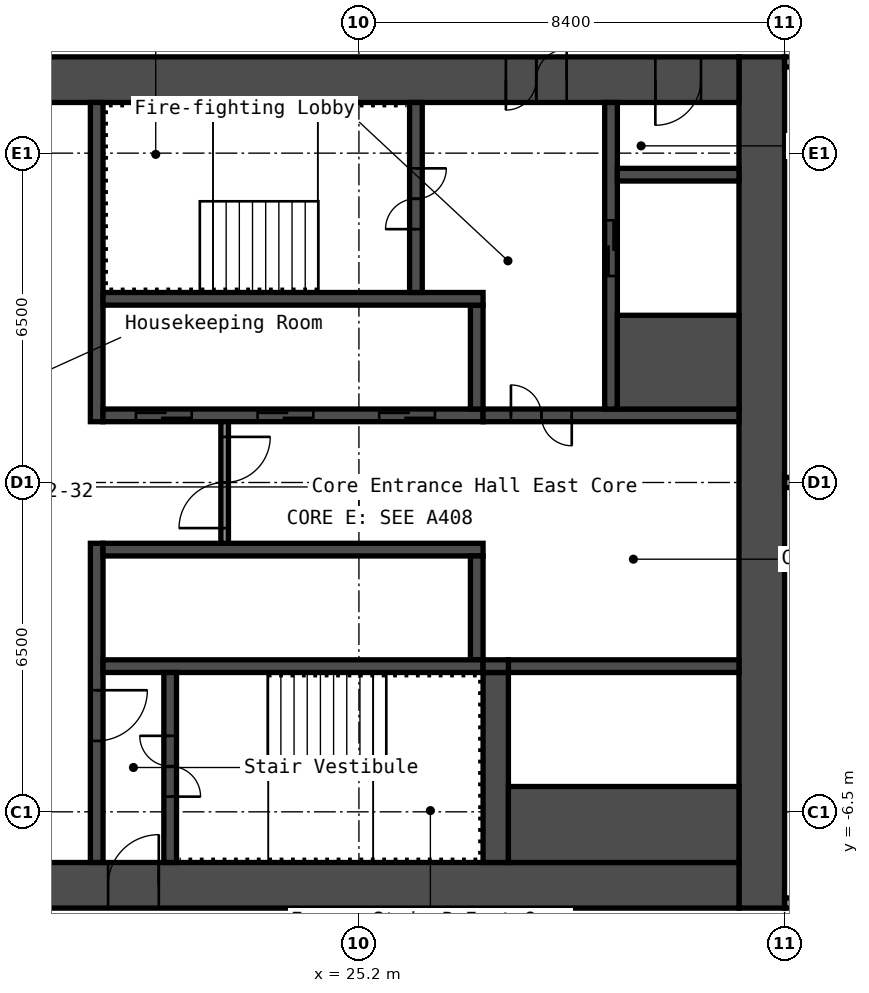
"""IFC4 building model, lengths in metres.
Left out: names, types, materials, properties, quantities, classifications, styles, units other than length and angle.
Written with IfcOpenShell. Run it as: python <this file> out.ifc"""

import sys

from ifc_helpers import new_model, si_unit, direction, frame, frame_2d, origin, place, context, subcontext, project, spatial, rectangle, extrude, element, fill, save


model = new_model("IFC4")
c1 = context("Model", 3, precision=1e-05, world=origin(), true_north=direction((0.0, 1.0)))
c2 = subcontext(c1, "Body", "Model", "MODEL_VIEW")
j1 = project(units=[si_unit("LENGTHUNIT", "METRE"), si_unit("PLANEANGLEUNIT", "RADIAN")], contexts=[c1])
p1 = place(None, origin())
s1 = spatial("IfcSite", under=j1, at=p1, CompositionType="ELEMENT")
p2 = place(p1, origin())
s2 = spatial("IfcBuilding", under=s1, at=p2, CompositionType="ELEMENT")
p3 = place(p2, frame((0.0, 0.0, 58.2)))
s3 = spatial("IfcBuildingStorey", under=s2, at=p3, CompositionType="ELEMENT", Elevation=58.2)
p4 = place(p3, frame((33.15, -8.4, 0.0), z_axis=(0.0, 0.0, 1.0), x_axis=(0.0, 1.0, 0.0)))
e1 = element("IfcWall", 1, at=p4, inside=s3, PredefinedType="SHEAR", context=c2, shape_type="SweptSolid", body=[
    extrude(rectangle(XDim=16.8, YDim=0.9, at=frame_2d((8.4, 0.0))), origin(), (0.0, 0.0, 1.0), 2.8),
])
p5 = place(p3, frame((17.7, 7.95, 0.0), z_axis=(0.0, 0.0, 1.0), x_axis=(1.0, 0.0, 0.0)))
e2 = element("IfcWall", 2, at=p5, inside=s3, PredefinedType="SHEAR", context=c2, shape_type="SweptSolid", body=[
    extrude(rectangle(XDim=15.0, YDim=0.9, at=frame_2d((7.5, 0.0))), origin(), (0.0, 0.0, 1.0), 2.8),
])
p6 = place(p5, frame((10.4, 0.0, 0.0)))
e3 = element("IfcOpeningElement", 3, at=p6, cuts=e2, PredefinedType="OPENING", context=c2, shape_type="SweptSolid", body=[
    extrude(rectangle(XDim=1.2, YDim=2.1, at=frame_2d((0.6, 1.05))), frame((0.0, 0.46, 0.0), z_axis=(0.0, -1.0, 0.0), x_axis=(1.0, 0.0, 0.0)), (0.0, 0.0, 1.0), 0.92),
])
p7 = place(p5, frame((13.35, 0.0, 0.0)))
e4 = element("IfcOpeningElement", 4, at=p7, cuts=e2, PredefinedType="OPENING", context=c2, shape_type="SweptSolid", body=[
    extrude(rectangle(XDim=0.9, YDim=2.1, at=frame_2d((0.45, 1.05))), frame((0.0, 0.46, 0.0), z_axis=(0.0, -1.0, 0.0), x_axis=(1.0, 0.0, 0.0)), (0.0, 0.0, 1.0), 0.92),
])
p8 = place(p3, frame((17.7, -7.95, 0.0), z_axis=(0.0, 0.0, 1.0), x_axis=(1.0, 0.0, 0.0)))
e5 = element("IfcWall", 5, at=p8, inside=s3, PredefinedType="SHEAR", context=c2, shape_type="SweptSolid", body=[
    extrude(rectangle(XDim=15.0, YDim=0.9, at=frame_2d((7.5, 0.0))), origin(), (0.0, 0.0, 1.0), 2.8),
])
p9 = place(p8, frame((2.55, 0.0, 0.0)))
e6 = element("IfcOpeningElement", 6, at=p9, cuts=e5, PredefinedType="OPENING", context=c2, shape_type="SweptSolid", body=[
    extrude(rectangle(XDim=1.0, YDim=2.1, at=frame_2d((0.5, 1.05))), frame((0.0, 0.46, 0.0), z_axis=(0.0, -1.0, 0.0), x_axis=(1.0, 0.0, 0.0)), (0.0, 0.0, 1.0), 0.92),
])
p10 = place(p3, frame((20.025, 1.2, 0.0), z_axis=(0.0, 0.0, 1.0), x_axis=(0.0, 1.0, 0.0)))
e7 = element("IfcWall", 7, at=p10, inside=s3, PredefinedType="SHEAR", context=c2, shape_type="SweptSolid", body=[
    extrude(rectangle(XDim=6.3, YDim=0.25, at=frame_2d((3.15, 0.0))), origin(), (0.0, 0.0, 1.0), 2.8),
])
p11 = place(p3, frame((20.025, -7.5, 0.0), z_axis=(0.0, 0.0, 1.0), x_axis=(0.0, 1.0, 0.0)))
e8 = element("IfcWall", 8, at=p11, inside=s3, PredefinedType="SHEAR", context=c2, shape_type="SweptSolid", body=[
    extrude(rectangle(XDim=6.3, YDim=0.25, at=frame_2d((3.15, 0.0))), origin(), (0.0, 0.0, 1.0), 2.8),
])
p12 = place(p11, frame((2.4, 0.0, 0.0)))
e9 = element("IfcOpeningElement", 9, at=p12, cuts=e8, PredefinedType="OPENING", context=c2, shape_type="SweptSolid", body=[
    extrude(rectangle(XDim=1.0, YDim=2.1, at=frame_2d((0.5, 1.05))), frame((0.0, 0.135, 0.0), z_axis=(0.0, -1.0, 0.0), x_axis=(1.0, 0.0, 0.0)), (0.0, 0.0, 1.0), 0.27),
])
p13 = place(p3, frame((20.15, 1.325, 0.0), z_axis=(0.0, 0.0, 1.0), x_axis=(1.0, 0.0, 0.0)))
e10 = element("IfcWall", 10, at=p13, inside=s3, PredefinedType="SHEAR", context=c2, shape_type="SweptSolid", body=[
    extrude(rectangle(XDim=7.5, YDim=0.25, at=frame_2d((3.75, 0.0))), origin(), (0.0, 0.0, 1.0), 2.8),
])
p14 = place(p13, frame((0.65, 0.0, 0.0)))
e11 = element("IfcOpeningElement", 11, at=p14, cuts=e10, PredefinedType="OPENING", context=c2, shape_type="SweptSolid", body=[
    extrude(rectangle(XDim=1.1, YDim=2.1, at=frame_2d((0.55, 1.05))), frame((0.0, 0.135, 0.0), z_axis=(0.0, -1.0, 0.0), x_axis=(1.0, 0.0, 0.0)), (0.0, 0.0, 1.0), 0.27),
])
p15 = place(p13, frame((3.05, 0.0, 0.0)))
e12 = element("IfcOpeningElement", 12, at=p15, cuts=e10, PredefinedType="OPENING", context=c2, shape_type="SweptSolid", body=[
    extrude(rectangle(XDim=1.1, YDim=2.1, at=frame_2d((0.55, 1.05))), frame((0.0, 0.135, 0.0), z_axis=(0.0, -1.0, 0.0), x_axis=(1.0, 0.0, 0.0)), (0.0, 0.0, 1.0), 0.27),
])
p16 = place(p13, frame((5.45, 0.0, 0.0)))
e13 = element("IfcOpeningElement", 13, at=p16, cuts=e10, PredefinedType="OPENING", context=c2, shape_type="SweptSolid", body=[
    extrude(rectangle(XDim=1.1, YDim=2.1, at=frame_2d((0.55, 1.05))), frame((0.0, 0.135, 0.0), z_axis=(0.0, -1.0, 0.0), x_axis=(1.0, 0.0, 0.0)), (0.0, 0.0, 1.0), 0.27),
])
p17 = place(p3, frame((27.525, 1.45, 0.0), z_axis=(0.0, 0.0, 1.0), x_axis=(0.0, 1.0, 0.0)))
e14 = element("IfcWall", 14, at=p17, inside=s3, PredefinedType="SHEAR", context=c2, shape_type="SweptSolid", body=[
    extrude(rectangle(XDim=2.05, YDim=0.25, at=frame_2d((1.025, 0.0))), origin(), (0.0, 0.0, 1.0), 2.8),
])
p18 = place(p3, frame((20.15, 3.625, 0.0), z_axis=(0.0, 0.0, 1.0), x_axis=(1.0, 0.0, 0.0)))
e15 = element("IfcWall", 15, at=p18, inside=s3, PredefinedType="SHEAR", context=c2, shape_type="SweptSolid", body=[
    extrude(rectangle(XDim=7.5, YDim=0.25, at=frame_2d((3.75, 0.0))), origin(), (0.0, 0.0, 1.0), 2.8),
])
p19 = place(p3, frame((26.325, 3.75, 0.0), z_axis=(0.0, 0.0, 1.0), x_axis=(0.0, 1.0, 0.0)))
e16 = element("IfcWall", 16, at=p19, inside=s3, PredefinedType="SHEAR", context=c2, shape_type="SweptSolid", body=[
    extrude(rectangle(XDim=3.75, YDim=0.25, at=frame_2d((1.875, 0.0))), origin(), (0.0, 0.0, 1.0), 2.8),
])
p20 = place(p19, frame((1.25, 0.0, 0.0)))
e17 = element("IfcOpeningElement", 17, at=p20, cuts=e16, PredefinedType="OPENING", context=c2, shape_type="SweptSolid", body=[
    extrude(rectangle(XDim=1.2, YDim=2.1, at=frame_2d((0.6, 1.05))), frame((0.0, 0.135, 0.0), z_axis=(0.0, -1.0, 0.0), x_axis=(1.0, 0.0, 0.0)), (0.0, 0.0, 1.0), 0.27),
])
p21 = place(p3, frame((27.65, 1.325, 0.0), z_axis=(0.0, 0.0, 1.0), x_axis=(1.0, 0.0, 0.0)))
e18 = element("IfcWall", 18, at=p21, inside=s3, PredefinedType="SHEAR", context=c2, shape_type="SweptSolid", body=[
    extrude(rectangle(XDim=5.05, YDim=0.25, at=frame_2d((2.525, 0.0))), origin(), (0.0, 0.0, 1.0), 2.8),
])
p22 = place(p21, frame((0.55, 0.0, 0.0)))
e19 = element("IfcOpeningElement", 19, at=p22, cuts=e18, PredefinedType="OPENING", context=c2, shape_type="SweptSolid", body=[
    extrude(rectangle(XDim=1.2, YDim=2.1, at=frame_2d((0.6, 1.05))), frame((0.0, 0.135, 0.0), z_axis=(0.0, -1.0, 0.0), x_axis=(1.0, 0.0, 0.0)), (0.0, 0.0, 1.0), 0.27),
])
p23 = place(p3, frame((30.175, 1.45, 0.0), z_axis=(0.0, 0.0, 1.0), x_axis=(0.0, 1.0, 0.0)))
e20 = element("IfcWall", 20, at=p23, inside=s3, PredefinedType="SHEAR", context=c2, shape_type="SweptSolid", body=[
    extrude(rectangle(XDim=6.05, YDim=0.25, at=frame_2d((3.025, 0.0))), origin(), (0.0, 0.0, 1.0), 2.8),
])
p24 = place(p23, frame((2.625, 0.0, 0.0)))
e21 = element("IfcOpeningElement", 21, at=p24, cuts=e20, PredefinedType="OPENING", context=c2, shape_type="SweptSolid", body=[
    extrude(rectangle(XDim=1.1, YDim=2.1, at=frame_2d((0.55, 1.05))), frame((0.0, 0.135, 0.0), z_axis=(0.0, -1.0, 0.0), x_axis=(1.0, 0.0, 0.0)), (0.0, 0.0, 1.0), 0.27),
])
p25 = place(p3, frame((30.3, 2.375, 0.0), z_axis=(0.0, 0.0, 1.0), x_axis=(1.0, 0.0, 0.0)))
e22 = element("IfcWall", 22, at=p25, inside=s3, PredefinedType="SHEAR", context=c2, shape_type="SweptSolid", body=[
    extrude(rectangle(XDim=2.4, YDim=1.85, at=frame_2d((1.2, 0.0))), origin(), (0.0, 0.0, 1.0), 2.8),
])
p26 = place(p3, frame((30.3, 6.075, 0.0), z_axis=(0.0, 0.0, 1.0), x_axis=(1.0, 0.0, 0.0)))
e23 = element("IfcWall", 23, at=p26, inside=s3, PredefinedType="SHEAR", context=c2, shape_type="SweptSolid", body=[
    extrude(rectangle(XDim=2.4, YDim=0.25, at=frame_2d((1.2, 0.0))), origin(), (0.0, 0.0, 1.0), 2.8),
])
p27 = place(p3, frame((20.15, -1.325, 0.0), z_axis=(0.0, 0.0, 1.0), x_axis=(1.0, 0.0, 0.0)))
e24 = element("IfcWall", 24, at=p27, inside=s3, PredefinedType="SHEAR", context=c2, shape_type="SweptSolid", body=[
    extrude(rectangle(XDim=7.5, YDim=0.25, at=frame_2d((3.75, 0.0))), origin(), (0.0, 0.0, 1.0), 2.8),
])
p28 = place(p3, frame((27.525, -3.5, 0.0), z_axis=(0.0, 0.0, 1.0), x_axis=(0.0, 1.0, 0.0)))
e25 = element("IfcWall", 25, at=p28, inside=s3, PredefinedType="SHEAR", context=c2, shape_type="SweptSolid", body=[
    extrude(rectangle(XDim=2.05, YDim=0.25, at=frame_2d((1.025, 0.0))), origin(), (0.0, 0.0, 1.0), 2.8),
])
p29 = place(p3, frame((20.15, -3.625, 0.0), z_axis=(0.0, 0.0, 1.0), x_axis=(1.0, 0.0, 0.0)))
e26 = element("IfcWall", 26, at=p29, inside=s3, PredefinedType="SHEAR", context=c2, shape_type="SweptSolid", body=[
    extrude(rectangle(XDim=7.5, YDim=0.25, at=frame_2d((3.75, 0.0))), origin(), (0.0, 0.0, 1.0), 2.8),
])
p30 = place(p3, frame((21.475, -7.5, 0.0), z_axis=(0.0, 0.0, 1.0), x_axis=(0.0, 1.0, 0.0)))
e27 = element("IfcWall", 27, at=p30, inside=s3, PredefinedType="SHEAR", context=c2, shape_type="SweptSolid", body=[
    extrude(rectangle(XDim=3.75, YDim=0.25, at=frame_2d((1.875, 0.0))), origin(), (0.0, 0.0, 1.0), 2.8),
])
p31 = place(p30, frame((1.3, 0.0, 0.0)))
e28 = element("IfcOpeningElement", 28, at=p31, cuts=e27, PredefinedType="OPENING", context=c2, shape_type="SweptSolid", body=[
    extrude(rectangle(XDim=1.2, YDim=2.1, at=frame_2d((0.6, 1.05))), frame((0.0, 0.135, 0.0), z_axis=(0.0, -1.0, 0.0), x_axis=(1.0, 0.0, 0.0)), (0.0, 0.0, 1.0), 0.27),
])
p32 = place(p3, frame((27.9, -7.5, 0.0), z_axis=(0.0, 0.0, 1.0), x_axis=(0.0, 1.0, 0.0)))
e29 = element("IfcWall", 29, at=p32, inside=s3, PredefinedType="SHEAR", context=c2, shape_type="SweptSolid", body=[
    extrude(rectangle(XDim=3.75, YDim=0.5, at=frame_2d((1.875, 0.0))), origin(), (0.0, 0.0, 1.0), 2.8),
])
p33 = place(p3, frame((28.15, -3.625, 0.0), z_axis=(0.0, 0.0, 1.0), x_axis=(1.0, 0.0, 0.0)))
e30 = element("IfcWall", 30, at=p33, inside=s3, PredefinedType="SHEAR", context=c2, shape_type="SweptSolid", body=[
    extrude(rectangle(XDim=4.55, YDim=0.25, at=frame_2d((2.275, 0.0))), origin(), (0.0, 0.0, 1.0), 2.8),
])
p34 = place(p3, frame((28.15, -6.75, 0.0), z_axis=(0.0, 0.0, 1.0), x_axis=(1.0, 0.0, 0.0)))
e31 = element("IfcWall", 31, at=p34, inside=s3, PredefinedType="SHEAR", context=c2, shape_type="SweptSolid", body=[
    extrude(rectangle(XDim=4.55, YDim=1.5, at=frame_2d((2.275, 0.0))), origin(), (0.0, 0.0, 1.0), 2.8),
])
p35 = place(p3, frame((27.65, -3.625, 0.0), z_axis=(0.0, 0.0, 1.0), x_axis=(1.0, 0.0, 0.0)))
e32 = element("IfcWall", 32, at=p35, inside=s3, PredefinedType="SHEAR", context=c2, shape_type="SweptSolid", body=[
    extrude(rectangle(XDim=0.5, YDim=0.25, at=frame_2d((0.25, 0.0))), origin(), (0.0, 0.0, 1.0), 2.8),
])
p36 = place(p3, frame((22.55, -1.2, 0.0), z_axis=(0.0, 0.0, 1.0), x_axis=(0.0, 1.0, 0.0)))
e33 = element("IfcWall", 33, at=p36, inside=s3, PredefinedType="PARTITIONING", context=c2, shape_type="SweptSolid", body=[
    extrude(rectangle(XDim=2.4, YDim=0.15, at=frame_2d((1.2, 0.0))), origin(), (0.0, 0.0, 1.0), 2.8),
])
p37 = place(p36, frame((0.3, 0.0, 0.0)))
e34 = element("IfcOpeningElement", 34, at=p37, cuts=e33, PredefinedType="OPENING", context=c2, shape_type="SweptSolid", body=[
    extrude(rectangle(XDim=1.8, YDim=2.1, at=frame_2d((0.9, 1.05))), frame((0.0, 0.085, 0.0), z_axis=(0.0, -1.0, 0.0), x_axis=(1.0, 0.0, 0.0)), (0.0, 0.0, 1.0), 0.17),
])
p38 = place(p3, frame((33.6, -8.3, 0.0), z_axis=(0.0, 0.0, 1.0), x_axis=(1.0, 0.0, 0.0)))
e35 = element("IfcWall", 35, at=p38, inside=s3, PredefinedType="PARTITIONING", context=c2, shape_type="SweptSolid", body=[
    extrude(rectangle(XDim=15.0, YDim=0.2, at=frame_2d((7.5, 0.0))), origin(), (0.0, 0.0, 1.0), 2.8),
])
p39 = place(p38, frame((2.0, 0.0, 0.0)))
e36 = element("IfcOpeningElement", 36, at=p39, cuts=e35, PredefinedType="OPENING", context=c2, shape_type="SweptSolid", body=[
    extrude(rectangle(XDim=1.0, YDim=2.1, at=frame_2d((0.5, 1.05))), frame((0.0, 0.11, 0.0), z_axis=(0.0, -1.0, 0.0), x_axis=(1.0, 0.0, 0.0)), (0.0, 0.0, 1.0), 0.22),
])
p40 = place(p38, frame((9.55, 0.0, 0.0)))
e37 = element("IfcOpeningElement", 37, at=p40, cuts=e35, PredefinedType="OPENING", context=c2, shape_type="SweptSolid", body=[
    extrude(rectangle(XDim=1.0, YDim=2.1, at=frame_2d((0.5, 1.05))), frame((0.0, 0.11, 0.0), z_axis=(0.0, -1.0, 0.0), x_axis=(1.0, 0.0, 0.0)), (0.0, 0.0, 1.0), 0.22),
])
p41 = place(p3, frame((33.6, 0.0, 0.0), z_axis=(0.0, 0.0, 1.0), x_axis=(1.0, 0.0, 0.0)))
e38 = element("IfcWall", 38, at=p41, inside=s3, PredefinedType="PARTITIONING", context=c2, shape_type="SweptSolid", body=[
    extrude(rectangle(XDim=14.9, YDim=0.2, at=frame_2d((7.45, 0.0))), origin(), (0.0, 0.0, 1.0), 2.8),
])
p42 = place(p3, frame((33.6, 8.3, 0.0), z_axis=(0.0, 0.0, 1.0), x_axis=(1.0, 0.0, 0.0)))
e39 = element("IfcWall", 39, at=p42, inside=s3, PredefinedType="PARTITIONING", context=c2, shape_type="SweptSolid", body=[
    extrude(rectangle(XDim=15.0, YDim=0.2, at=frame_2d((7.5, 0.0))), origin(), (0.0, 0.0, 1.0), 2.8),
])
p43 = place(p42, frame((2.0, 0.0, 0.0)))
e40 = element("IfcOpeningElement", 40, at=p43, cuts=e39, PredefinedType="OPENING", context=c2, shape_type="SweptSolid", body=[
    extrude(rectangle(XDim=1.0, YDim=2.1, at=frame_2d((0.5, 1.05))), frame((0.0, 0.11, 0.0), z_axis=(0.0, -1.0, 0.0), x_axis=(1.0, 0.0, 0.0)), (0.0, 0.0, 1.0), 0.22),
])
p44 = place(p42, frame((12.9, 0.0, 0.0)))
e41 = element("IfcOpeningElement", 41, at=p44, cuts=e39, PredefinedType="OPENING", context=c2, shape_type="SweptSolid", body=[
    extrude(rectangle(XDim=1.0, YDim=2.1, at=frame_2d((0.5, 1.05))), frame((0.0, 0.11, 0.0), z_axis=(0.0, -1.0, 0.0), x_axis=(1.0, 0.0, 0.0)), (0.0, 0.0, 1.0), 0.22),
])
p45 = place(p6, origin())
e42 = element("IfcDoor", 42, at=p45, inside=s3, OperationType="DOUBLE_DOOR_SINGLE_SWING", PredefinedType="DOOR", context=c2, shape_type="SweptSolid", body=[
    extrude(rectangle(XDim=1.2, YDim=2.1, at=frame_2d((0.6, 1.05))), frame((0.0, 0.025, 0.0), z_axis=(0.0, -1.0, 0.0), x_axis=(1.0, 0.0, 0.0)), (0.0, 0.0, 1.0), 0.05),
])
fill(e3, e42)
p46 = place(p7, origin())
e43 = element("IfcDoor", 43, at=p46, inside=s3, OperationType="SINGLE_SWING_LEFT", PredefinedType="DOOR", context=c2, shape_type="SweptSolid", body=[
    extrude(rectangle(XDim=0.9, YDim=2.1, at=frame_2d((0.45, 1.05))), frame((0.0, 0.025, 0.0), z_axis=(0.0, -1.0, 0.0), x_axis=(1.0, 0.0, 0.0)), (0.0, 0.0, 1.0), 0.05),
])
fill(e4, e43)
p47 = place(p9, origin())
e44 = element("IfcDoor", 44, at=p47, inside=s3, OperationType="SINGLE_SWING_LEFT", PredefinedType="DOOR", context=c2, shape_type="SweptSolid", body=[
    extrude(rectangle(XDim=1.0, YDim=2.1, at=frame_2d((0.5, 1.05))), frame((0.0, 0.025, 0.0), z_axis=(0.0, -1.0, 0.0), x_axis=(1.0, 0.0, 0.0)), (0.0, 0.0, 1.0), 0.05),
])
fill(e6, e44)
p48 = place(p20, origin())
e45 = element("IfcDoor", 45, at=p48, inside=s3, OperationType="DOUBLE_DOOR_SINGLE_SWING", PredefinedType="DOOR", context=c2, shape_type="SweptSolid", body=[
    extrude(rectangle(XDim=1.2, YDim=2.1, at=frame_2d((0.6, 1.05))), frame((0.0, 0.025, 0.0), z_axis=(0.0, -1.0, 0.0), x_axis=(1.0, 0.0, 0.0)), (0.0, 0.0, 1.0), 0.05),
])
fill(e17, e45)
p49 = place(p31, origin())
e46 = element("IfcDoor", 46, at=p49, inside=s3, OperationType="DOUBLE_DOOR_SINGLE_SWING", PredefinedType="DOOR", context=c2, shape_type="SweptSolid", body=[
    extrude(rectangle(XDim=1.2, YDim=2.1, at=frame_2d((0.6, 1.05))), frame((0.0, 0.025, 0.0), z_axis=(0.0, -1.0, 0.0), x_axis=(1.0, 0.0, 0.0)), (0.0, 0.0, 1.0), 0.05),
])
fill(e28, e46)
p50 = place(p12, origin())
e47 = element("IfcDoor", 47, at=p50, inside=s3, OperationType="SINGLE_SWING_RIGHT", PredefinedType="DOOR", context=c2, shape_type="SweptSolid", body=[
    extrude(rectangle(XDim=1.0, YDim=2.1, at=frame_2d((0.5, 1.05))), frame((0.0, 0.025, 0.0), z_axis=(0.0, -1.0, 0.0), x_axis=(1.0, 0.0, 0.0)), (0.0, 0.0, 1.0), 0.05),
])
fill(e9, e47)
p51 = place(p22, origin())
e48 = element("IfcDoor", 48, at=p51, inside=s3, OperationType="DOUBLE_DOOR_SINGLE_SWING", PredefinedType="DOOR", context=c2, shape_type="SweptSolid", body=[
    extrude(rectangle(XDim=1.2, YDim=2.1, at=frame_2d((0.6, 1.05))), frame((0.0, 0.025, 0.0), z_axis=(0.0, -1.0, 0.0), x_axis=(1.0, 0.0, 0.0)), (0.0, 0.0, 1.0), 0.05),
])
fill(e19, e48)
p52 = place(p37, origin())
e49 = element("IfcDoor", 49, at=p52, inside=s3, OperationType="DOUBLE_DOOR_SINGLE_SWING", PredefinedType="DOOR", context=c2, shape_type="SweptSolid", body=[
    extrude(rectangle(XDim=1.8, YDim=2.1, at=frame_2d((0.9, 1.05))), frame((0.0, 0.025, 0.0), z_axis=(0.0, -1.0, 0.0), x_axis=(1.0, 0.0, 0.0)), (0.0, 0.0, 1.0), 0.05),
])
fill(e34, e49)
p53 = place(p14, origin())
e50 = element("IfcDoor", 50, at=p53, inside=s3, OperationType="DOUBLE_DOOR_SLIDING", PredefinedType="DOOR", context=c2, shape_type="SweptSolid", body=[
    extrude(rectangle(XDim=1.1, YDim=2.1, at=frame_2d((0.55, 1.05))), frame((0.0, 0.025, 0.0), z_axis=(0.0, -1.0, 0.0), x_axis=(1.0, 0.0, 0.0)), (0.0, 0.0, 1.0), 0.05),
])
fill(e11, e50)
p54 = place(p15, origin())
e51 = element("IfcDoor", 51, at=p54, inside=s3, OperationType="DOUBLE_DOOR_SLIDING", PredefinedType="DOOR", context=c2, shape_type="SweptSolid", body=[
    extrude(rectangle(XDim=1.1, YDim=2.1, at=frame_2d((0.55, 1.05))), frame((0.0, 0.025, 0.0), z_axis=(0.0, -1.0, 0.0), x_axis=(1.0, 0.0, 0.0)), (0.0, 0.0, 1.0), 0.05),
])
fill(e12, e51)
p55 = place(p16, origin())
e52 = element("IfcDoor", 52, at=p55, inside=s3, OperationType="DOUBLE_DOOR_SLIDING", PredefinedType="DOOR", context=c2, shape_type="SweptSolid", body=[
    extrude(rectangle(XDim=1.1, YDim=2.1, at=frame_2d((0.55, 1.05))), frame((0.0, 0.025, 0.0), z_axis=(0.0, -1.0, 0.0), x_axis=(1.0, 0.0, 0.0)), (0.0, 0.0, 1.0), 0.05),
])
fill(e13, e52)
p56 = place(p24, origin())
e53 = element("IfcDoor", 53, at=p56, inside=s3, OperationType="DOUBLE_DOOR_SLIDING", PredefinedType="DOOR", context=c2, shape_type="SweptSolid", body=[
    extrude(rectangle(XDim=1.1, YDim=2.1, at=frame_2d((0.55, 1.05))), frame((0.0, 0.025, 0.0), z_axis=(0.0, -1.0, 0.0), x_axis=(1.0, 0.0, 0.0)), (0.0, 0.0, 1.0), 0.05),
])
fill(e21, e53)
save(model, sys.argv[1])
